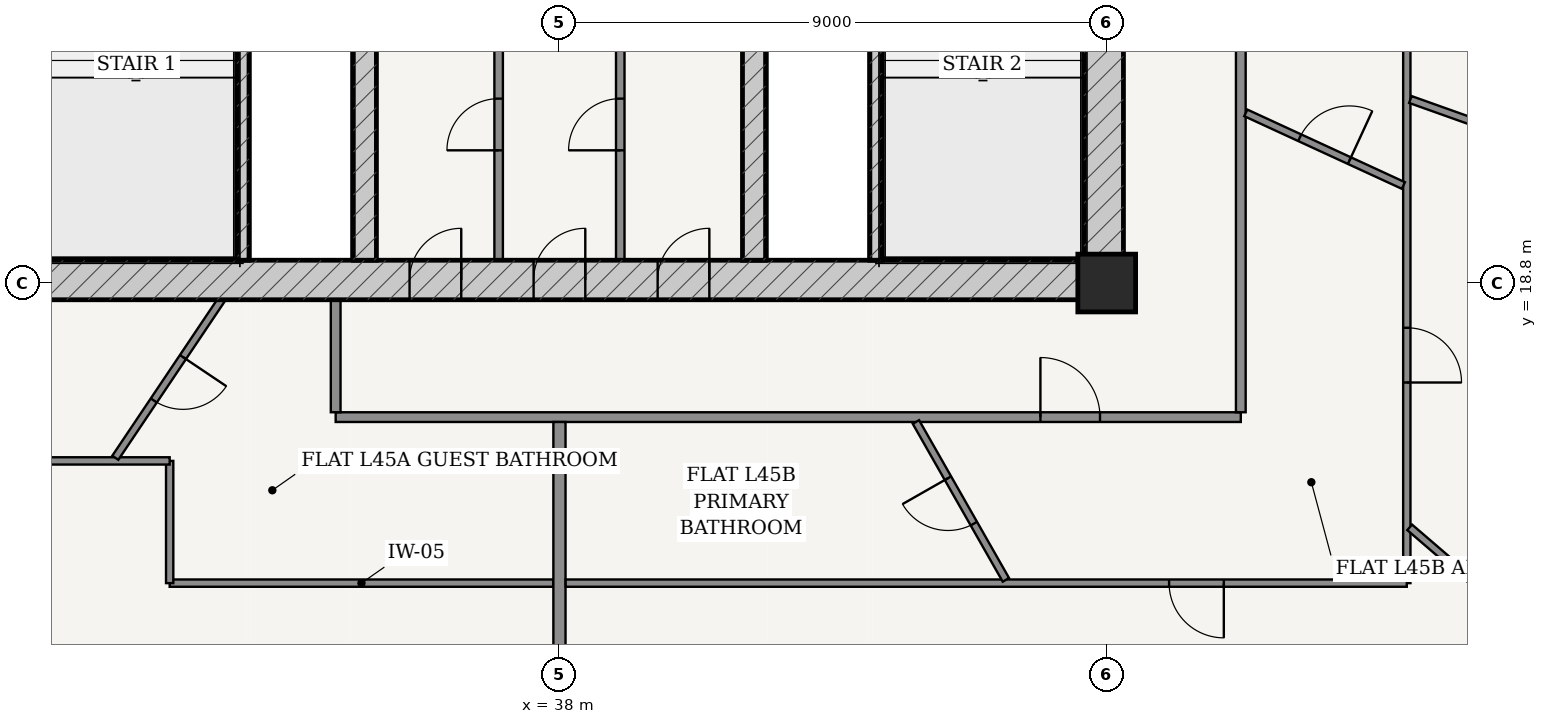
"""IFC4 building model, lengths in metres.
Left out: names, types, materials, properties, quantities, classifications, styles, units other than length and angle.
Written with IfcOpenShell. Run it as: python <this file> out.ifc"""

import sys

from ifc_helpers import new_model, si_unit, direction, frame, frame_2d, origin, origin_2d, place, context, subcontext, project, spatial, rectangle, extrude, source, transform, mapped, element, fill, save


model = new_model("IFC4")
c1 = context("Model", 3, precision=1e-05, world=origin(), true_north=direction((-0.2419218956, 0.970295726276)))
c2 = subcontext(c1, "Body", "Model", "MODEL_VIEW")
j1 = project(units=[si_unit("LENGTHUNIT", "METRE"), si_unit("PLANEANGLEUNIT", "RADIAN")], contexts=[c1])
p1 = place(None, origin())
s1 = spatial("IfcSite", under=j1, at=p1, CompositionType="ELEMENT")
p2 = place(p1, origin())
s2 = spatial("IfcBuilding", under=s1, at=p2, CompositionType="ELEMENT")
p3 = place(p2, frame((0.0, 0.0, 171.4)))
s3 = spatial("IfcBuildingStorey", under=s2, at=p3, CompositionType="ELEMENT", Elevation=171.4)
p4 = place(p3, frame((47.0, 18.8, 0.0), z_axis=(0.0, 0.0, 1.0), x_axis=(1.0, 0.0, 0.0)))
e1 = element("IfcColumn", 1, at=p4, inside=s3, PredefinedType="COLUMN", context=c2, shape_type="SweptSolid", body=[
    extrude(rectangle(XDim=0.95, YDim=0.95, at=origin_2d()), origin(), (0.0, 0.0, 1.0), 3.6),
])
p5 = place(p3, frame((28.725, 18.85, 0.0), z_axis=(0.0, 0.0, 1.0), x_axis=(1.0, 0.0, 0.0)))
e2 = element("IfcWall", 2, at=p5, inside=s3, PredefinedType="SHEAR", context=c2, shape_type="SweptSolid", body=[
    extrude(rectangle(XDim=18.55, YDim=0.65, at=frame_2d((9.275, 0.0))), origin(), (0.0, 0.0, 1.0), 3.33),
])
p6 = place(p5, frame((6.81, 0.0, 0.0)))
e3 = element("IfcOpeningElement", 3, at=p6, cuts=e2, PredefinedType="OPENING", context=c2, shape_type="SweptSolid", body=[
    extrude(rectangle(XDim=0.85, YDim=2.1, at=frame_2d((0.425, 1.05))), frame((0.0, 0.335, 0.0), z_axis=(0.0, -1.0, 0.0), x_axis=(1.0, 0.0, 0.0)), (0.0, 0.0, 1.0), 0.67),
])
p7 = place(p5, frame((8.85, 0.0, 0.0)))
e4 = element("IfcOpeningElement", 4, at=p7, cuts=e2, PredefinedType="OPENING", context=c2, shape_type="SweptSolid", body=[
    extrude(rectangle(XDim=0.85, YDim=2.1, at=frame_2d((0.425, 1.05))), frame((0.0, 0.335, 0.0), z_axis=(0.0, -1.0, 0.0), x_axis=(1.0, 0.0, 0.0)), (0.0, 0.0, 1.0), 0.67),
])
p8 = place(p5, frame((10.89, 0.0, 0.0)))
e5 = element("IfcOpeningElement", 5, at=p8, cuts=e2, PredefinedType="OPENING", context=c2, shape_type="SweptSolid", body=[
    extrude(rectangle(XDim=0.85, YDim=2.1, at=frame_2d((0.425, 1.05))), frame((0.0, 0.335, 0.0), z_axis=(0.0, -1.0, 0.0), x_axis=(1.0, 0.0, 0.0)), (0.0, 0.0, 1.0), 0.67),
])
p9 = place(p3, frame((46.95, 19.175, 0.0), z_axis=(0.0, 0.0, 1.0), x_axis=(0.0, 1.0, 0.0)))
e6 = element("IfcWall", 6, at=p9, inside=s3, PredefinedType="SHEAR", context=c2, shape_type="SweptSolid", body=[
    extrude(rectangle(XDim=15.25, YDim=0.65, at=frame_2d((7.625, 0.0))), origin(), (0.0, 0.0, 1.0), 3.33),
])
p10 = place(p9, frame((9.875, 0.0, 0.0)))
e7 = element("IfcOpeningElement", 7, at=p10, cuts=e6, PredefinedType="OPENING", context=c2, shape_type="SweptSolid", body=[
    extrude(rectangle(XDim=1.5, YDim=2.2, at=frame_2d((0.75, 1.1))), frame((0.0, 0.335, 0.0), z_axis=(0.0, -1.0, 0.0), x_axis=(1.0, 0.0, 0.0)), (0.0, 0.0, 1.0), 0.67),
])
for number, where, z_axis, x_axis in (
    (8, (32.795, 19.175, 0.0), (0.0, 0.0, 1.0), (0.0, 1.0, 0.0)),
    (9, (43.205, 19.175, 0.0), (0.0, 0.0, 1.0), (0.0, 1.0, 0.0)),
):
    element("IfcWall", number, at=place(p3, frame(where, z_axis=z_axis, x_axis=x_axis)), inside=s3, PredefinedType="SOLIDWALL", context=c2, shape_type="SweptSolid", body=[
        extrude(rectangle(XDim=7.375, YDim=0.2, at=frame_2d((3.688, 0.0))), origin(), (0.0, 0.0, 1.0), 3.33),
    ])
p11 = place(p3, frame((34.8, 19.175, 0.0), z_axis=(0.0, 0.0, 1.0), x_axis=(0.0, 1.0, 0.0)))
e10 = element("IfcWall", 10, at=p11, inside=s3, PredefinedType="SHEAR", context=c2, shape_type="SweptSolid", body=[
    extrude(rectangle(XDim=15.25, YDim=0.38, at=frame_2d((7.625, 0.0))), origin(), (0.0, 0.0, 1.0), 3.33),
])
p12 = place(p11, frame((7.8, 0.0, 0.0)))
e11 = element("IfcOpeningElement", 11, at=p12, cuts=e10, PredefinedType="OPENING", context=c2, shape_type="SweptSolid", body=[
    extrude(rectangle(XDim=1.05, YDim=2.15, at=frame_2d((0.525, 1.075))), frame((0.0, 0.2, 0.0), z_axis=(0.0, -1.0, 0.0), x_axis=(1.0, 0.0, 0.0)), (0.0, 0.0, 1.0), 0.4),
])
p13 = place(p3, frame((41.2, 19.175, 0.0), z_axis=(0.0, 0.0, 1.0), x_axis=(0.0, 1.0, 0.0)))
e12 = element("IfcWall", 12, at=p13, inside=s3, PredefinedType="SHEAR", context=c2, shape_type="SweptSolid", body=[
    extrude(rectangle(XDim=15.25, YDim=0.38, at=frame_2d((7.625, 0.0))), origin(), (0.0, 0.0, 1.0), 3.33),
])
p14 = place(p13, frame((7.8, 0.0, 0.0)))
e13 = element("IfcOpeningElement", 13, at=p14, cuts=e12, PredefinedType="OPENING", context=c2, shape_type="SweptSolid", body=[
    extrude(rectangle(XDim=1.05, YDim=2.15, at=frame_2d((0.525, 1.075))), frame((0.0, 0.2, 0.0), z_axis=(0.0, -1.0, 0.0), x_axis=(1.0, 0.0, 0.0)), (0.0, 0.0, 1.0), 0.4),
])
p15 = place(p3, frame((51.367, 9.478, 0.0), z_axis=(0.0, 0.0, 1.0), x_axis=(0.75843401647, 0.651749831348, 0.0)))
e14 = element("IfcWall", 14, at=p15, inside=s3, PredefinedType="SOLIDWALL", context=c2, shape_type="SweptSolid", body=[
    extrude(rectangle(XDim=8.952, YDim=0.28, at=frame_2d((4.476, 0.0))), origin(), (0.0, 0.0, 1.0), 3.33),
])
p16 = place(p15, frame((1.367, 0.0, 0.85)))
e15 = element("IfcOpeningElement", 15, at=p16, cuts=e14, PredefinedType="OPENING", context=c2, shape_type="SweptSolid", body=[
    extrude(rectangle(XDim=2.1, YDim=1.95, at=frame_2d((1.05, 0.975))), frame((0.0, 0.15, 0.0), z_axis=(0.0, -1.0, 0.0), x_axis=(1.0, 0.0, 0.0)), (0.0, 0.0, 1.0), 0.3),
])
p17 = place(p15, frame((5.485, 0.0, 0.85)))
e16 = element("IfcOpeningElement", 16, at=p17, cuts=e14, PredefinedType="OPENING", context=c2, shape_type="SweptSolid", body=[
    extrude(rectangle(XDim=2.1, YDim=1.95, at=frame_2d((1.05, 0.975))), frame((0.0, 0.15, 0.0), z_axis=(0.0, -1.0, 0.0), x_axis=(1.0, 0.0, 0.0)), (0.0, 0.0, 1.0), 0.3),
])
p18 = place(p3, frame((37.0, 19.175, 0.0), z_axis=(0.0, 0.0, 1.0), x_axis=(0.0, 1.0, 0.0)))
e17 = element("IfcWall", 17, at=p18, inside=s3, PredefinedType="PARTITIONING", context=c2, shape_type="SweptSolid", body=[
    extrude(rectangle(XDim=4.465, YDim=0.14, at=frame_2d((2.232, 0.0))), origin(), (0.0, 0.0, 1.0), 3.33),
])
p19 = place(p18, frame((1.808, 0.0, 0.0)))
e18 = element("IfcOpeningElement", 18, at=p19, cuts=e17, PredefinedType="OPENING", context=c2, shape_type="SweptSolid", body=[
    extrude(rectangle(XDim=0.85, YDim=2.1, at=frame_2d((0.425, 1.05))), frame((0.0, 0.08, 0.0), z_axis=(0.0, -1.0, 0.0), x_axis=(1.0, 0.0, 0.0)), (0.0, 0.0, 1.0), 0.16),
])
p20 = place(p3, frame((39.0, 19.175, 0.0), z_axis=(0.0, 0.0, 1.0), x_axis=(0.0, 1.0, 0.0)))
e19 = element("IfcWall", 19, at=p20, inside=s3, PredefinedType="PARTITIONING", context=c2, shape_type="SweptSolid", body=[
    extrude(rectangle(XDim=4.465, YDim=0.14, at=frame_2d((2.232, 0.0))), origin(), (0.0, 0.0, 1.0), 3.33),
])
p21 = place(p20, frame((1.808, 0.0, 0.0)))
e20 = element("IfcOpeningElement", 20, at=p21, cuts=e19, PredefinedType="OPENING", context=c2, shape_type="SweptSolid", body=[
    extrude(rectangle(XDim=0.85, YDim=2.1, at=frame_2d((0.425, 1.05))), frame((0.0, 0.08, 0.0), z_axis=(0.0, -1.0, 0.0), x_axis=(1.0, 0.0, 0.0)), (0.0, 0.0, 1.0), 0.16),
])
p22 = place(p3, frame((34.32, 16.595, 0.0), z_axis=(0.0, 0.0, 1.0), x_axis=(1.0, 0.0, 0.0)))
e21 = element("IfcWall", 21, at=p22, inside=s3, PredefinedType="PARTITIONING", context=c2, shape_type="SweptSolid", body=[
    extrude(rectangle(XDim=14.885, YDim=0.16, at=frame_2d((7.442, 0.0))), origin(), (0.0, 0.0, 1.0), 2.776),
])
p23 = place(p22, frame((11.59, 0.0, 0.0)))
e22 = element("IfcOpeningElement", 22, at=p23, cuts=e21, PredefinedType="OPENING", context=c2, shape_type="SweptSolid", body=[
    extrude(rectangle(XDim=0.98, YDim=2.2, at=frame_2d((0.49, 1.1))), frame((0.0, 0.09, 0.0), z_axis=(0.0, -1.0, 0.0), x_axis=(1.0, 0.0, 0.0)), (0.0, 0.0, 1.0), 0.18),
])
p24 = place(p3, frame((34.32, 16.675, 0.0), z_axis=(0.0, 0.0, 1.0), x_axis=(0.0, 1.0, 0.0)))
e23 = element("IfcWall", 23, at=p24, inside=s3, PredefinedType="PARTITIONING", context=c2, shape_type="SweptSolid", body=[
    extrude(rectangle(XDim=1.85, YDim=0.16, at=frame_2d((0.925, 0.0))), origin(), (0.0, 0.0, 1.0), 3.33),
])
p25 = place(p3, frame((49.205, 16.675, 0.0), z_axis=(0.0, 0.0, 1.0), x_axis=(0.0, 1.0, 0.0)))
e24 = element("IfcWall", 24, at=p25, inside=s3, PredefinedType="PARTITIONING", context=c2, shape_type="SweptSolid", body=[
    extrude(rectangle(XDim=18.4, YDim=0.16, at=frame_2d((9.2, 0.0))), origin(), (0.0, 0.0, 1.0), 2.776),
])
p26 = place(p3, frame((37.898, 13.865, 0.0), z_axis=(0.0, 0.0, 1.0), x_axis=(-1.0, 0.0, 0.0)))
e25 = element("IfcWall", 25, at=p26, inside=s3, PredefinedType="PARTITIONING", context=c2, shape_type="SweptSolid", body=[
    extrude(rectangle(XDim=6.308, YDim=0.12, at=frame_2d((3.154, 0.0))), origin(), (0.0, 0.0, 1.0), 2.776),
])
p27 = place(p3, frame((31.59, 13.865, 0.0), z_axis=(0.0, 0.0, 1.0), x_axis=(0.0, 1.0, 0.0)))
e26 = element("IfcWall", 26, at=p27, inside=s3, PredefinedType="PARTITIONING", context=c2, shape_type="SweptSolid", body=[
    extrude(rectangle(XDim=2.01, YDim=0.12, at=frame_2d((1.005, 0.0))), origin(), (0.0, 0.0, 1.0), 3.005),
])
p28 = place(p3, frame((31.59, 15.875, 0.0), z_axis=(0.0, 0.0, 1.0), x_axis=(-1.0, 0.0, 0.0)))
e27 = element("IfcWall", 27, at=p28, inside=s3, PredefinedType="PARTITIONING", context=c2, shape_type="SweptSolid", body=[
    extrude(rectangle(XDim=5.515, YDim=0.12, at=frame_2d((2.758, 0.0))), origin(), (0.0, 0.0, 1.0), 2.776),
])
p29 = place(p3, frame((32.441, 18.525, 0.0), z_axis=(0.0, 0.0, 1.0), x_axis=(-0.557594690071, -0.830113342625, 0.0)))
e28 = element("IfcWall", 28, at=p29, inside=s3, PredefinedType="PARTITIONING", context=c2, shape_type="SweptSolid", body=[
    extrude(rectangle(XDim=3.13, YDim=0.12, at=frame_2d((1.565, 0.0))), origin(), (0.0, 0.0, 1.0), 3.33),
])
p30 = place(p29, frame((1.135, 0.0, 0.0)))
e29 = element("IfcOpeningElement", 29, at=p30, cuts=e28, PredefinedType="OPENING", context=c2, shape_type="SweptSolid", body=[
    extrude(rectangle(XDim=0.86, YDim=2.15, at=frame_2d((0.43, 1.075))), frame((0.0, 0.07, 0.0), z_axis=(0.0, -1.0, 0.0), x_axis=(1.0, 0.0, 0.0)), (0.0, 0.0, 1.0), 0.14),
])
p31 = place(p3, frame((38.0, 16.515, 0.0), z_axis=(0.0, 0.0, 1.0), x_axis=(0.0, -1.0, 0.0)))
e30 = element("IfcWall", 30, at=p31, inside=s3, PredefinedType="PARTITIONING", context=c2, shape_type="SweptSolid", body=[
    extrude(rectangle(XDim=10.455, YDim=0.2, at=frame_2d((5.228, 0.0))), origin(), (0.0, 0.0, 1.0), 2.846),
])
p32 = place(p3, frame((51.935, 37.885, 0.0), z_axis=(0.0, 0.0, 1.0), x_axis=(0.0, -1.0, 0.0)))
e31 = element("IfcWall", 31, at=p32, inside=s3, PredefinedType="PARTITIONING", context=c2, shape_type="SweptSolid", body=[
    extrude(rectangle(XDim=24.02, YDim=0.12, at=frame_2d((12.01, 0.0))), origin(), (0.0, 0.0, 1.0), 2.776),
])
p33 = place(p32, frame((19.821, 0.0, 0.0)))
e32 = element("IfcOpeningElement", 32, at=p33, cuts=e31, PredefinedType="OPENING", context=c2, shape_type="SweptSolid", body=[
    extrude(rectangle(XDim=0.9, YDim=2.15, at=frame_2d((0.45, 1.075))), frame((0.0, 0.07, 0.0), z_axis=(0.0, -1.0, 0.0), x_axis=(1.0, 0.0, 0.0)), (0.0, 0.0, 1.0), 0.14),
])
p34 = place(p3, frame((51.935, 13.865, 0.0), z_axis=(0.0, 0.0, 1.0), x_axis=(-1.0, 0.0, 0.0)))
e33 = element("IfcWall", 33, at=p34, inside=s3, PredefinedType="PARTITIONING", context=c2, shape_type="SweptSolid", body=[
    extrude(rectangle(XDim=13.833, YDim=0.12, at=frame_2d((6.917, 0.0))), origin(), (0.0, 0.0, 1.0), 2.776),
])
p35 = place(p34, frame((3.009, 0.0, 0.0)))
e34 = element("IfcOpeningElement", 34, at=p35, cuts=e33, PredefinedType="OPENING", context=c2, shape_type="SweptSolid", body=[
    extrude(rectangle(XDim=0.9, YDim=2.15, at=frame_2d((0.45, 1.075))), frame((0.0, 0.07, 0.0), z_axis=(0.0, -1.0, 0.0), x_axis=(1.0, 0.0, 0.0)), (0.0, 0.0, 1.0), 0.14),
])
p36 = place(p3, frame((51.982, 14.782, 0.0), z_axis=(0.0, 0.0, 1.0), x_axis=(0.758356837469, -0.651839632935, 0.0)))
e35 = element("IfcWall", 35, at=p36, inside=s3, PredefinedType="PARTITIONING", context=c2, shape_type="SweptSolid", body=[
    extrude(rectangle(XDim=4.064, YDim=0.12, at=frame_2d((2.032, 0.0))), origin(), (0.0, 0.0, 1.0), 2.846),
])
p37 = place(p3, frame((51.993, 21.818, 0.0), z_axis=(0.0, 0.0, 1.0), x_axis=(0.942077868165, -0.335394231187, 0.0)))
e36 = element("IfcWall", 36, at=p37, inside=s3, PredefinedType="PARTITIONING", context=c2, shape_type="SweptSolid", body=[
    extrude(rectangle(XDim=8.817, YDim=0.12, at=frame_2d((4.408, 0.0))), origin(), (0.0, 0.0, 1.0), 2.846),
])
p38 = place(p37, frame((3.958, 0.0, 0.0)))
e37 = element("IfcOpeningElement", 37, at=p38, cuts=e36, PredefinedType="OPENING", context=c2, shape_type="SweptSolid", body=[
    extrude(rectangle(XDim=0.9, YDim=2.15, at=frame_2d((0.45, 1.075))), frame((0.0, 0.07, 0.0), z_axis=(0.0, -1.0, 0.0), x_axis=(1.0, 0.0, 0.0)), (0.0, 0.0, 1.0), 0.14),
])
p39 = place(p3, frame((43.862, 16.515, 0.0), z_axis=(0.0, 0.0, 1.0), x_axis=(0.495214761056, -0.868770591372, 0.0)))
e38 = element("IfcWall", 38, at=p39, inside=s3, PredefinedType="PARTITIONING", context=c2, shape_type="SweptSolid", body=[
    extrude(rectangle(XDim=2.988, YDim=0.12, at=frame_2d((1.494, 0.0))), origin(), (0.0, 0.0, 1.0), 3.005),
])
p40 = place(p39, frame((1.064, 0.0, 0.0)))
e39 = element("IfcOpeningElement", 39, at=p40, cuts=e38, PredefinedType="OPENING", context=c2, shape_type="SweptSolid", body=[
    extrude(rectangle(XDim=0.86, YDim=2.15, at=frame_2d((0.43, 1.075))), frame((0.0, 0.07, 0.0), z_axis=(0.0, -1.0, 0.0), x_axis=(1.0, 0.0, 0.0)), (0.0, 0.0, 1.0), 0.14),
])
p41 = place(p3, frame((49.287, 21.598, 0.0), z_axis=(0.0, 0.0, 1.0), x_axis=(0.908177096136, -0.418586146514, 0.0)))
e40 = element("IfcWall", 40, at=p41, inside=s3, PredefinedType="PARTITIONING", context=c2, shape_type="SweptSolid", body=[
    extrude(rectangle(XDim=2.854, YDim=0.12, at=frame_2d((1.427, 0.0))), origin(), (0.0, 0.0, 1.0), 3.33),
])
p42 = place(p41, frame((0.977, 0.0, 0.0)))
e41 = element("IfcOpeningElement", 41, at=p42, cuts=e40, PredefinedType="OPENING", context=c2, shape_type="SweptSolid", body=[
    extrude(rectangle(XDim=0.9, YDim=2.15, at=frame_2d((0.45, 1.075))), frame((0.0, 0.07, 0.0), z_axis=(0.0, -1.0, 0.0), x_axis=(1.0, 0.0, 0.0)), (0.0, 0.0, 1.0), 0.14),
])
m1 = source(origin(), c2, "Body", "SweptSolid", [
    extrude(rectangle(XDim=0.85, YDim=2.1, at=frame_2d((0.425, 1.05))), frame((0.0, 0.025, 0.0), z_axis=(0.0, -1.0, 0.0), x_axis=(1.0, 0.0, 0.0)), (0.0, 0.0, 1.0), 0.05),
])
p43 = place(p6, origin())
e42 = element("IfcDoor", 42, at=p43, inside=s3, OperationType="SINGLE_SWING_RIGHT", PredefinedType="DOOR", context=c2, shape_type="MappedRepresentation", body=[
    mapped(m1, transform((0.0, 0.0, 0.0), scale=1.0)),
])
fill(e3, e42)
p44 = place(p7, origin())
e43 = element("IfcDoor", 43, at=p44, inside=s3, OperationType="SINGLE_SWING_RIGHT", PredefinedType="DOOR", context=c2, shape_type="MappedRepresentation", body=[
    mapped(m1, transform((0.0, 0.0, 0.0), scale=1.0)),
])
fill(e4, e43)
p45 = place(p8, origin())
e44 = element("IfcDoor", 44, at=p45, inside=s3, OperationType="SINGLE_SWING_RIGHT", PredefinedType="DOOR", context=c2, shape_type="MappedRepresentation", body=[
    mapped(m1, transform((0.0, 0.0, 0.0), scale=1.0)),
])
fill(e5, e44)
p46 = place(p19, origin())
e45 = element("IfcDoor", 45, at=p46, inside=s3, OperationType="SINGLE_SWING_LEFT", PredefinedType="DOOR", context=c2, shape_type="MappedRepresentation", body=[
    mapped(m1, transform((0.0, 0.0, 0.0), scale=1.0)),
])
fill(e18, e45)
p47 = place(p21, origin())
e46 = element("IfcDoor", 46, at=p47, inside=s3, OperationType="SINGLE_SWING_LEFT", PredefinedType="DOOR", context=c2, shape_type="MappedRepresentation", body=[
    mapped(m1, transform((0.0, 0.0, 0.0), scale=1.0)),
])
fill(e20, e46)
m2 = source(origin(), c2, "Body", "SweptSolid", [
    extrude(rectangle(XDim=0.86, YDim=2.15, at=frame_2d((0.43, 1.075))), frame((0.0, 0.025, 0.0), z_axis=(0.0, -1.0, 0.0), x_axis=(1.0, 0.0, 0.0)), (0.0, 0.0, 1.0), 0.05),
])
p48 = place(p30, origin())
e47 = element("IfcDoor", 47, at=p48, inside=s3, OperationType="SINGLE_SWING_LEFT", PredefinedType="DOOR", context=c2, shape_type="MappedRepresentation", body=[
    mapped(m2, transform((0.0, 0.0, 0.0), scale=1.0)),
])
fill(e29, e47)
m3 = source(origin(), c2, "Body", "SweptSolid", [
    extrude(rectangle(XDim=0.98, YDim=2.2, at=frame_2d((0.49, 1.1))), frame((0.0, 0.025, 0.0), z_axis=(0.0, -1.0, 0.0), x_axis=(1.0, 0.0, 0.0)), (0.0, 0.0, 1.0), 0.05),
])
p49 = place(p23, origin())
e48 = element("IfcDoor", 48, at=p49, inside=s3, OperationType="SINGLE_SWING_LEFT", PredefinedType="DOOR", context=c2, shape_type="MappedRepresentation", body=[
    mapped(m3, transform((0.0, 0.0, 0.0), scale=1.0)),
])
fill(e22, e48)
p50 = place(p40, frame((0.86, 0.0, 0.0), z_axis=(0.0, 0.0, 1.0), x_axis=(-1.0, 0.0, 0.0)))
e49 = element("IfcDoor", 49, at=p50, inside=s3, OperationType="SINGLE_SWING_RIGHT", PredefinedType="DOOR", context=c2, shape_type="MappedRepresentation", body=[
    mapped(m2, transform((0.0, 0.0, 0.0), scale=1.0)),
])
fill(e39, e49)
m4 = source(origin(), c2, "Body", "SweptSolid", [
    extrude(rectangle(XDim=0.9, YDim=2.15, at=frame_2d((0.45, 1.075))), frame((0.0, 0.025, 0.0), z_axis=(0.0, -1.0, 0.0), x_axis=(1.0, 0.0, 0.0)), (0.0, 0.0, 1.0), 0.05),
])
p51 = place(p35, origin())
e50 = element("IfcDoor", 50, at=p51, inside=s3, OperationType="SINGLE_SWING_LEFT", PredefinedType="DOOR", context=c2, shape_type="MappedRepresentation", body=[
    mapped(m4, transform((0.0, 0.0, 0.0), scale=1.0)),
])
fill(e34, e50)
p52 = place(p42, origin())
e51 = element("IfcDoor", 51, at=p52, inside=s3, OperationType="SINGLE_SWING_RIGHT", PredefinedType="DOOR", context=c2, shape_type="MappedRepresentation", body=[
    mapped(m4, transform((0.0, 0.0, 0.0), scale=1.0)),
])
fill(e41, e51)
p53 = place(p33, origin())
e52 = element("IfcDoor", 52, at=p53, inside=s3, OperationType="SINGLE_SWING_RIGHT", PredefinedType="DOOR", context=c2, shape_type="MappedRepresentation", body=[
    mapped(m4, transform((0.0, 0.0, 0.0), scale=1.0)),
])
fill(e32, e52)
save(model, sys.argv[1])
